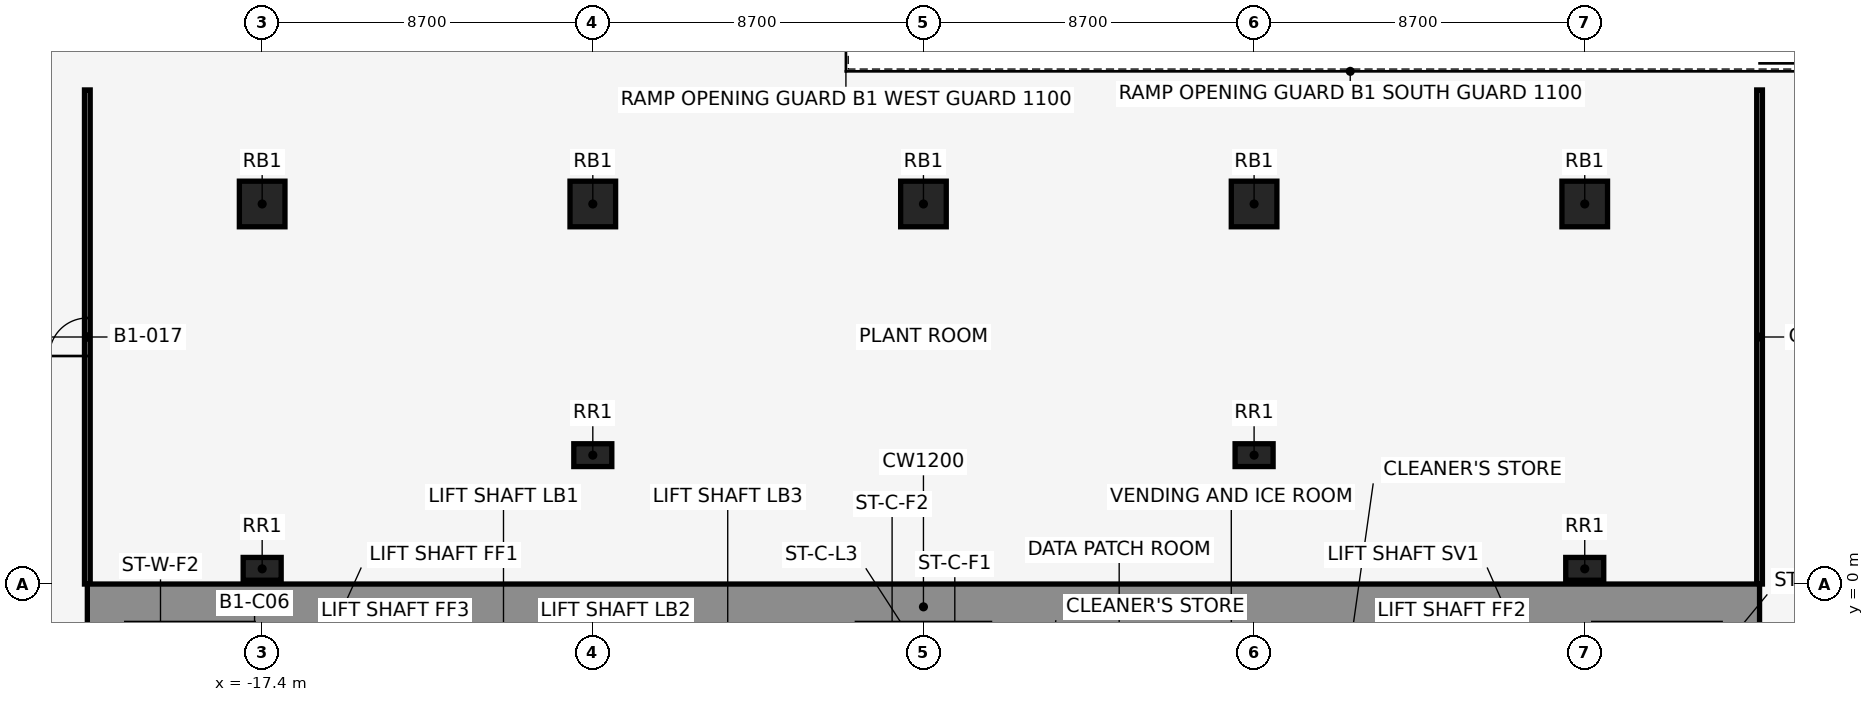
"""IFC4 building model, lengths in metres.
Left out: names, types, materials, properties, quantities, classifications, styles, units other than length and angle.
Written with IfcOpenShell. Run it as: python <this file> out.ifc"""

import sys

from ifc_helpers import new_model, si_unit, direction, frame, frame_2d, origin, origin_2d, place, context, subcontext, project, spatial, rectangle, extrude, element, fill, save


model = new_model("IFC4")
c1 = context("Model", 3, precision=1e-05, world=origin(), true_north=direction((0.0, 1.0)))
c2 = subcontext(c1, "Body", "Model", "MODEL_VIEW")
j1 = project(units=[si_unit("LENGTHUNIT", "METRE"), si_unit("PLANEANGLEUNIT", "RADIAN")], contexts=[c1])
p1 = place(None, origin())
s1 = spatial("IfcSite", under=j1, at=p1, CompositionType="ELEMENT")
p2 = place(p1, origin())
s2 = spatial("IfcBuilding", under=s1, at=p2, CompositionType="ELEMENT")
p3 = place(p2, frame((0.0, 0.0, -5.0)))
s3 = spatial("IfcBuildingStorey", under=s2, at=p3, CompositionType="ELEMENT", Elevation=-5.0)
for number, where, z_axis, x_axis in (
    (1, (-8.7, 3.391, 0.0), (0.0, 0.0, 1.0), (1.0, 0.0, 0.0)),
    (2, (-17.4, 0.4, 0.0), (0.0, 0.0, 1.0), (1.0, 0.0, 0.0)),
    (3, (8.7, 3.391, 0.0), (0.0, 0.0, 1.0), (1.0, 0.0, 0.0)),
    (4, (17.4, 0.4, 0.0), (0.0, 0.0, 1.0), (1.0, 0.0, 0.0)),
):
    element("IfcColumn", number, at=place(p3, frame(where, z_axis=z_axis, x_axis=x_axis)), inside=s3, PredefinedType="COLUMN", context=c2, shape_type="SweptSolid", body=[
        extrude(rectangle(XDim=1.0, YDim=0.6, at=origin_2d()), origin(), (0.0, 0.0, 1.0), 4.4),
    ])
for number, where, z_axis, x_axis in (
    (5, (-17.4, 10.0, 0.0), (0.0, 0.0, 1.0), (1.0, 0.0, 0.0)),
    (6, (-8.7, 10.0, 0.0), (0.0, 0.0, 1.0), (1.0, 0.0, 0.0)),
    (7, (0.0, 10.0, 0.0), (0.0, 0.0, 1.0), (1.0, 0.0, 0.0)),
    (8, (8.7, 10.0, 0.0), (0.0, 0.0, 1.0), (1.0, 0.0, 0.0)),
    (9, (17.4, 10.0, 0.0), (0.0, 0.0, 1.0), (1.0, 0.0, 0.0)),
):
    element("IfcColumn", number, at=place(p3, frame(where, z_axis=z_axis, x_axis=x_axis)), inside=s3, PredefinedType="COLUMN", context=c2, shape_type="SweptSolid", body=[
        extrude(rectangle(XDim=1.2, YDim=1.2, at=origin_2d()), origin(), (0.0, 0.0, 1.0), 4.4),
    ])
p4 = place(p3, frame((-22.0, 0.0, 0.0), z_axis=(0.0, 0.0, 1.0), x_axis=(0.0, 1.0, 0.0)))
e10 = element("IfcWall", 10, at=p4, inside=s3, PredefinedType="PARTITIONING", context=c2, shape_type="SweptSolid", body=[
    extrude(rectangle(XDim=13.0, YDim=0.15, at=frame_2d((6.5, 0.0))), origin(), (0.0, 0.0, 1.0), 4.7),
])
p5 = place(p4, frame((6.0, 0.0, 0.0)))
e11 = element("IfcOpeningElement", 11, at=p5, cuts=e10, PredefinedType="OPENING", context=c2, shape_type="SweptSolid", body=[
    extrude(rectangle(XDim=1.0, YDim=2.1, at=frame_2d((0.5, 1.05))), frame((0.0, 0.087, 0.0), z_axis=(0.0, -1.0, 0.0), x_axis=(1.0, 0.0, 0.0)), (0.0, 0.0, 1.0), 0.174),
])
p6 = place(p3, frame((22.0, 0.0, 0.0), z_axis=(0.0, 0.0, 1.0), x_axis=(0.0, 1.0, 0.0)))
e12 = element("IfcWall", 12, at=p6, inside=s3, PredefinedType="PARTITIONING", context=c2, shape_type="SweptSolid", body=[
    extrude(rectangle(XDim=13.0, YDim=0.15, at=frame_2d((6.5, 0.0))), origin(), (0.0, 0.0, 1.0), 4.7),
])
p7 = place(p3, frame((-22.0, -0.6, 0.0), z_axis=(0.0, 0.0, 1.0), x_axis=(1.0, 0.0, 0.0)))
e13 = element("IfcWall", 13, at=p7, inside=s3, PredefinedType="SHEAR", context=c2, shape_type="SweptSolid", body=[
    extrude(rectangle(XDim=44.0, YDim=1.2, at=frame_2d((22.0, 0.0))), origin(), (0.0, 0.0, 1.0), 5.0),
])
p8 = place(p5, frame((1.0, 0.0, 0.0), z_axis=(0.0, 0.0, 1.0), x_axis=(-1.0, 0.0, 0.0)))
e14 = element("IfcDoor", 14, at=p8, inside=s3, OperationType="SINGLE_SWING_RIGHT", PredefinedType="DOOR", context=c2, shape_type="SweptSolid", body=[
    extrude(rectangle(XDim=1.0, YDim=2.1, at=frame_2d((0.5, 1.05))), frame((0.0, 0.025, 0.0), z_axis=(0.0, -1.0, 0.0), x_axis=(1.0, 0.0, 0.0)), (0.0, 0.0, 1.0), 0.05),
])
fill(e11, e14)
save(model, sys.argv[1])
